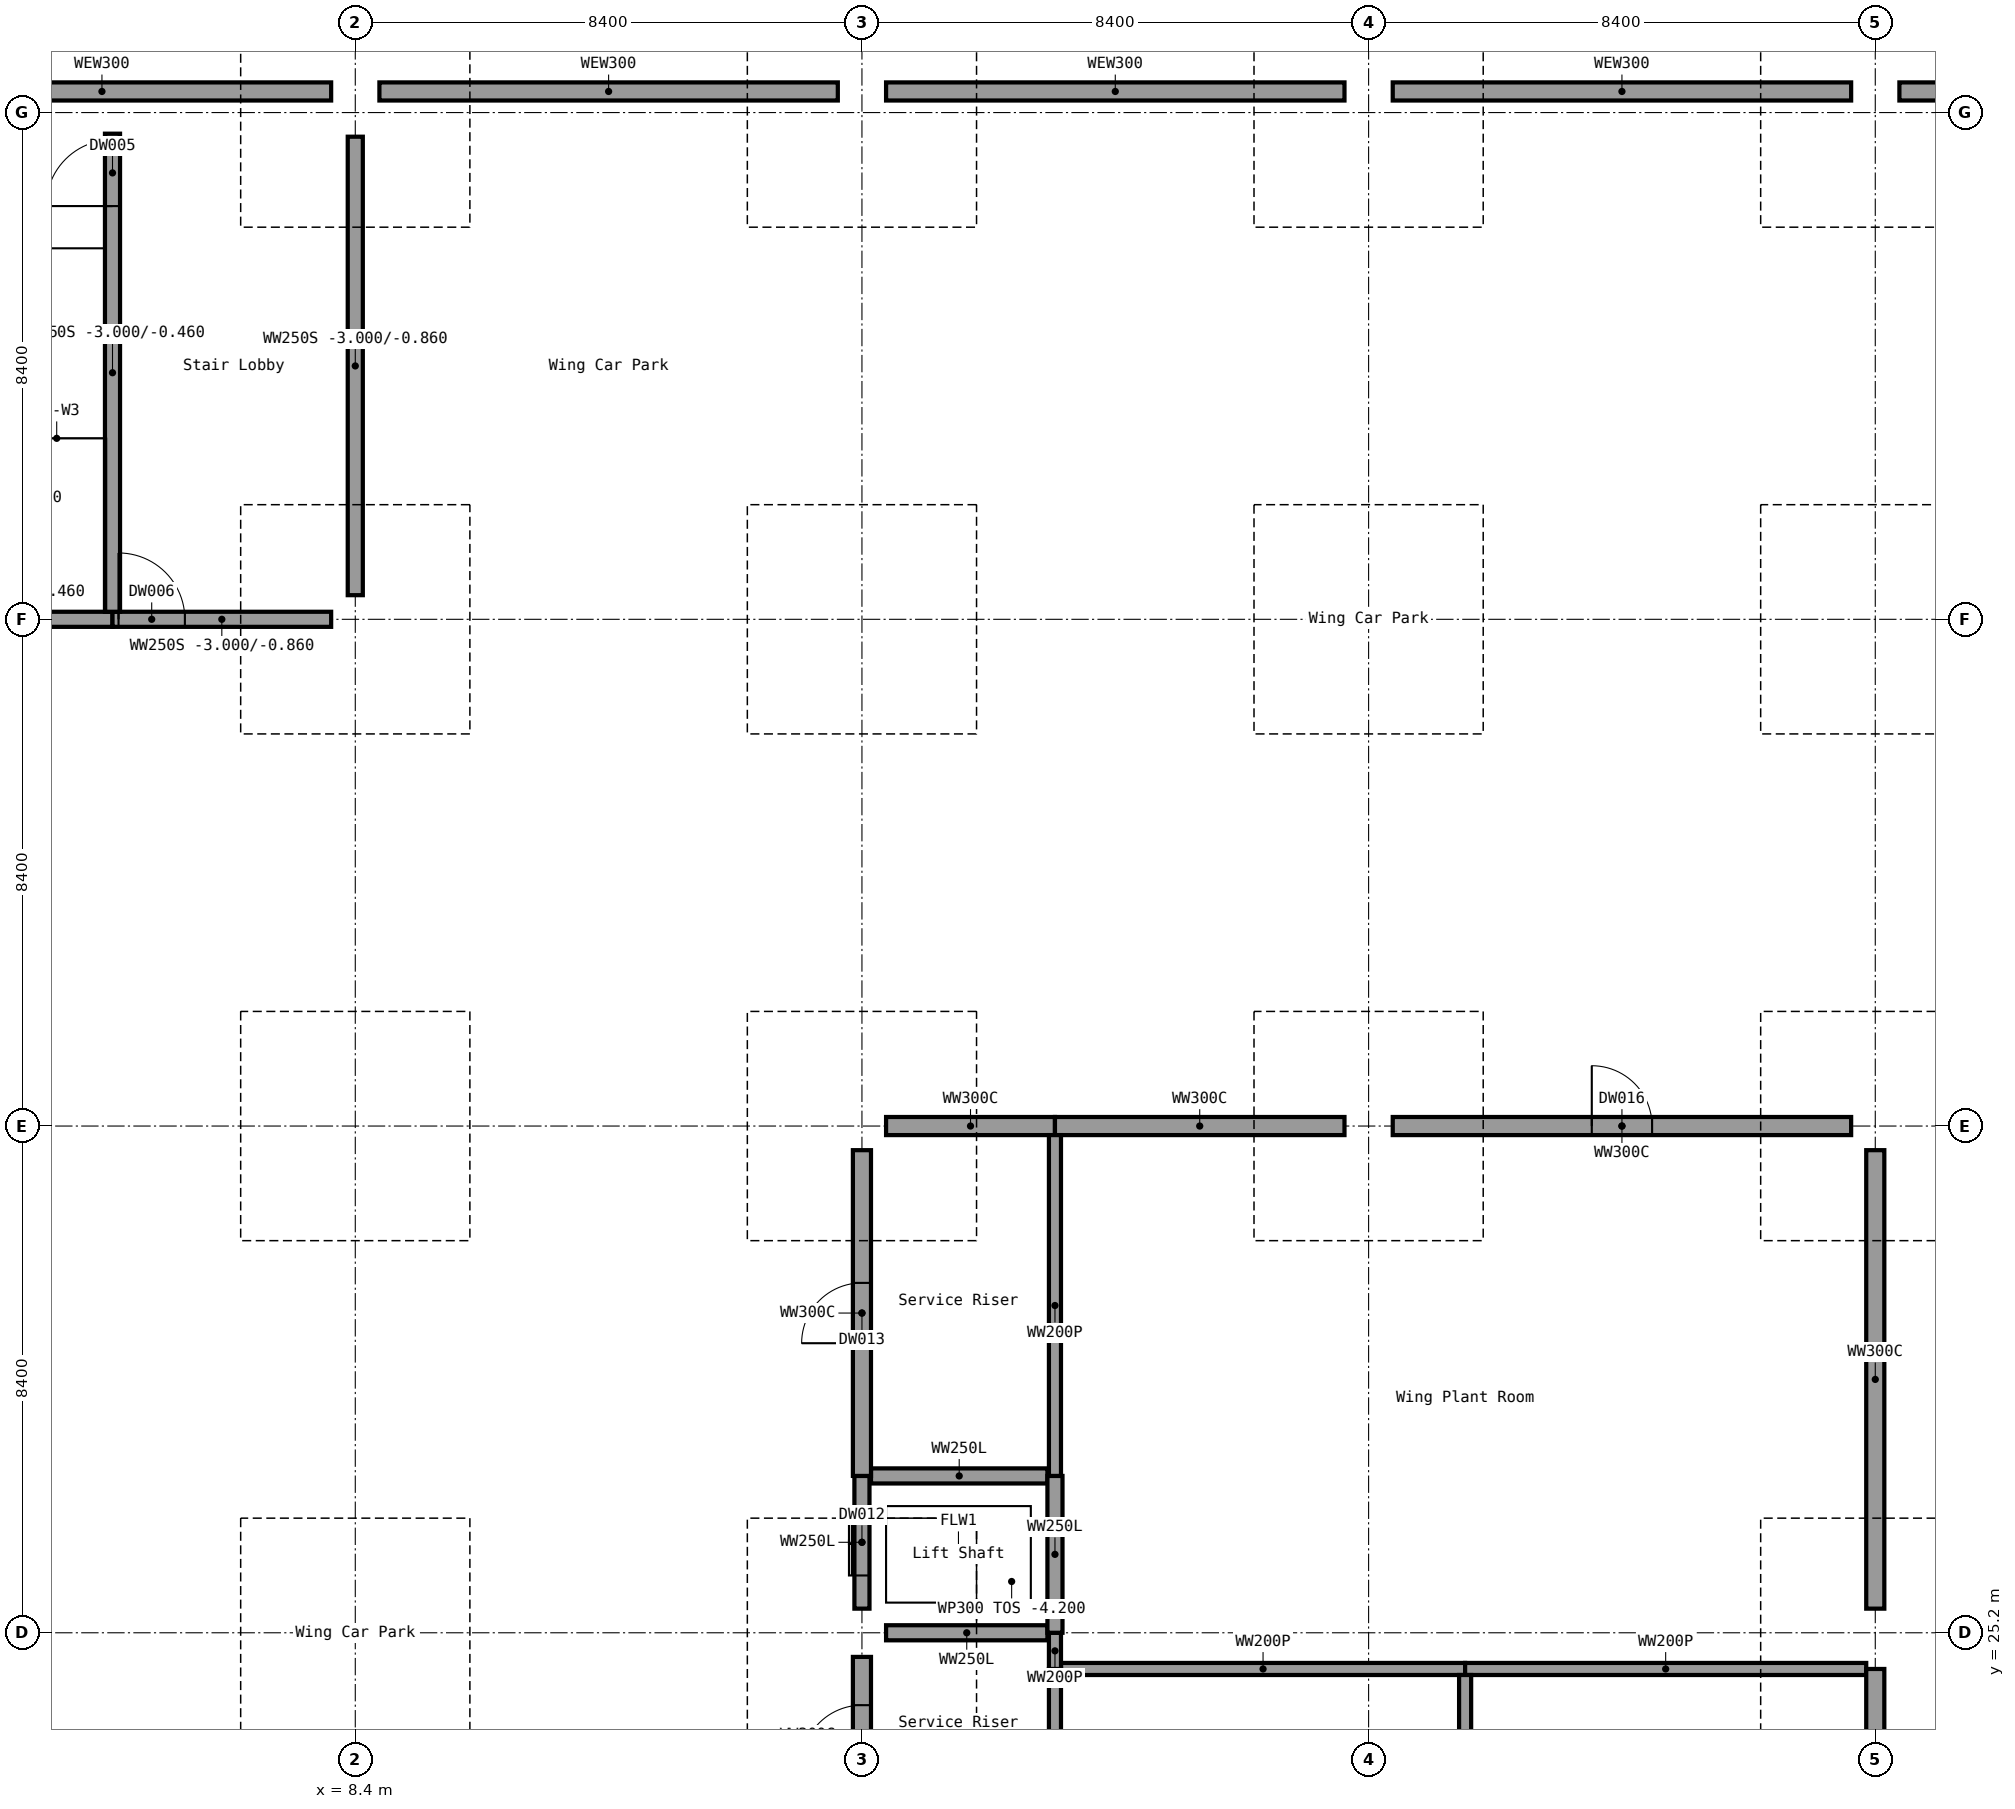
"""IFC4 building model, lengths in metres.
Left out: names, types, materials, properties, quantities, classifications, styles, units other than length and angle.
Written with IfcOpenShell. Run it as: python <this file> out.ifc"""

import sys

from ifc_helpers import new_model, si_unit, direction, frame, frame_2d, origin, origin_2d, place, context, subcontext, project, spatial, rectangle, extrude, element, fill, save


model = new_model("IFC4")
c1 = context("Model", 3, precision=1e-05, world=origin(), true_north=direction((0.0, 1.0)))
c2 = subcontext(c1, "Body", "Model", "MODEL_VIEW")
j1 = project(units=[si_unit("LENGTHUNIT", "METRE"), si_unit("PLANEANGLEUNIT", "RADIAN")], contexts=[c1])
p1 = place(None, origin())
s1 = spatial("IfcSite", under=j1, at=p1, CompositionType="ELEMENT")
p2 = place(p1, origin())
s2 = spatial("IfcBuilding", under=s1, at=p2, CompositionType="ELEMENT")
p3 = place(p2, frame((0.0, 0.0, -3.0)))
s3 = spatial("IfcBuildingStorey", under=s2, at=p3, CompositionType="ELEMENT", Elevation=-3.0)
for number, where, z_axis, x_axis in (
    (1, (8.4, 25.2, 0.0), (0.0, 0.0, 1.0), (1.0, 0.0, 0.0)),
    (2, (8.4, 33.6, 0.0), (0.0, 0.0, 1.0), (1.0, 0.0, 0.0)),
    (3, (8.4, 42.0, 0.0), (0.0, 0.0, 1.0), (1.0, 0.0, 0.0)),
    (4, (8.4, 50.4, 0.0), (0.0, 0.0, 1.0), (1.0, 0.0, 0.0)),
    (5, (16.8, 25.2, 0.0), (0.0, 0.0, 1.0), (1.0, 0.0, 0.0)),
    (6, (16.8, 33.6, 0.0), (0.0, 0.0, 1.0), (1.0, 0.0, 0.0)),
    (7, (16.8, 42.0, 0.0), (0.0, 0.0, 1.0), (1.0, 0.0, 0.0)),
    (8, (16.8, 50.4, 0.0), (0.0, 0.0, 1.0), (1.0, 0.0, 0.0)),
    (9, (25.2, 33.6, 0.0), (0.0, 0.0, 1.0), (1.0, 0.0, 0.0)),
    (10, (25.2, 42.0, 0.0), (0.0, 0.0, 1.0), (1.0, 0.0, 0.0)),
    (11, (25.2, 50.4, 0.0), (0.0, 0.0, 1.0), (1.0, 0.0, 0.0)),
    (12, (33.6, 25.2, 0.0), (0.0, 0.0, 1.0), (1.0, 0.0, 0.0)),
    (13, (33.6, 33.6, 0.0), (0.0, 0.0, 1.0), (1.0, 0.0, 0.0)),
    (14, (33.6, 42.0, 0.0), (0.0, 0.0, 1.0), (1.0, 0.0, 0.0)),
    (15, (33.6, 50.4, 0.0), (0.0, 0.0, 1.0), (1.0, 0.0, 0.0)),
):
    element("IfcColumn", number, at=place(p3, frame(where, z_axis=z_axis, x_axis=x_axis)), inside=s3, PredefinedType="COLUMN", context=c2, shape_type="SweptSolid", body=[
        extrude(rectangle(XDim=0.8, YDim=0.8, at=origin_2d()), origin(), (0.0, 0.0, 1.0), 3.0),
    ])
p4 = place(p3, frame((0.4, 50.75, 0.0), z_axis=(0.0, 0.0, 1.0), x_axis=(1.0, 0.0, 0.0)))
e16 = element("IfcWall", 16, at=p4, inside=s3, PredefinedType="SOLIDWALL", context=c2, shape_type="SweptSolid", body=[
    extrude(rectangle(XDim=7.6, YDim=0.3, at=frame_2d((3.8, 0.0))), origin(), (0.0, 0.0, 1.0), 2.3),
])
p5 = place(p3, frame((8.8, 50.75, 0.0), z_axis=(0.0, 0.0, 1.0), x_axis=(1.0, 0.0, 0.0)))
e17 = element("IfcWall", 17, at=p5, inside=s3, PredefinedType="SOLIDWALL", context=c2, shape_type="SweptSolid", body=[
    extrude(rectangle(XDim=7.6, YDim=0.3, at=frame_2d((3.8, 0.0))), origin(), (0.0, 0.0, 1.0), 2.3),
])
p6 = place(p3, frame((17.2, 50.75, 0.0), z_axis=(0.0, 0.0, 1.0), x_axis=(1.0, 0.0, 0.0)))
e18 = element("IfcWall", 18, at=p6, inside=s3, PredefinedType="SOLIDWALL", context=c2, shape_type="SweptSolid", body=[
    extrude(rectangle(XDim=7.6, YDim=0.3, at=frame_2d((3.8, 0.0))), origin(), (0.0, 0.0, 1.0), 2.3),
])
p7 = place(p3, frame((25.6, 50.75, 0.0), z_axis=(0.0, 0.0, 1.0), x_axis=(1.0, 0.0, 0.0)))
e19 = element("IfcWall", 19, at=p7, inside=s3, PredefinedType="SOLIDWALL", context=c2, shape_type="SweptSolid", body=[
    extrude(rectangle(XDim=7.6, YDim=0.3, at=frame_2d((3.8, 0.0))), origin(), (0.0, 0.0, 1.0), 2.3),
])
p8 = place(p3, frame((34.0, 50.75, 0.0), z_axis=(0.0, 0.0, 1.0), x_axis=(1.0, 0.0, 0.0)))
e20 = element("IfcWall", 20, at=p8, inside=s3, PredefinedType="SOLIDWALL", context=c2, shape_type="SweptSolid", body=[
    extrude(rectangle(XDim=7.6, YDim=0.3, at=frame_2d((3.8, 0.0))), origin(), (0.0, 0.0, 1.0), 2.3),
])
p9 = place(p3, frame((20.1, 24.6, 0.0), z_axis=(0.0, 0.0, 1.0), x_axis=(1.0, 0.0, 0.0)))
e21 = element("IfcWall", 21, at=p9, inside=s3, PredefinedType="SOLIDWALL", context=c2, shape_type="SweptSolid", body=[
    extrude(rectangle(XDim=6.7, YDim=0.2, at=frame_2d((3.35, 0.0))), origin(), (0.0, 0.0, 1.0), 2.54),
])
p10 = place(p3, frame((26.8, 24.6, 0.0), z_axis=(0.0, 0.0, 1.0), x_axis=(1.0, 0.0, 0.0)))
e22 = element("IfcWall", 22, at=p10, inside=s3, PredefinedType="SOLIDWALL", context=c2, shape_type="SweptSolid", body=[
    extrude(rectangle(XDim=6.65, YDim=0.2, at=frame_2d((3.325, 0.0))), origin(), (0.0, 0.0, 1.0), 2.54),
])
p11 = place(p3, frame((17.2, 25.2, -1.2), z_axis=(0.0, 0.0, 1.0), x_axis=(1.0, 0.0, 0.0)))
e23 = element("IfcWall", 23, at=p11, inside=s3, PredefinedType="SHEAR", context=c2, shape_type="SweptSolid", body=[
    extrude(rectangle(XDim=2.675, YDim=0.25, at=frame_2d((1.337, 0.0))), origin(), (0.0, 0.0, 1.0), 3.74),
])
p12 = place(p3, frame((16.95, 27.8, -1.2), z_axis=(0.0, 0.0, 1.0), x_axis=(1.0, 0.0, 0.0)))
e24 = element("IfcWall", 24, at=p12, inside=s3, PredefinedType="SHEAR", context=c2, shape_type="SweptSolid", body=[
    extrude(rectangle(XDim=2.925, YDim=0.25, at=frame_2d((1.462, 0.0))), origin(), (0.0, 0.0, 1.0), 3.74),
])
p13 = place(p3, frame((17.2, 33.6, 0.0), z_axis=(0.0, 0.0, 1.0), x_axis=(1.0, 0.0, 0.0)))
e25 = element("IfcWall", 25, at=p13, inside=s3, PredefinedType="SHEAR", context=c2, shape_type="SweptSolid", body=[
    extrude(rectangle(XDim=2.8, YDim=0.3, at=frame_2d((1.4, 0.0))), origin(), (0.0, 0.0, 1.0), 2.54),
])
p14 = place(p3, frame((20.0, 33.6, 0.0), z_axis=(0.0, 0.0, 1.0), x_axis=(1.0, 0.0, 0.0)))
e26 = element("IfcWall", 26, at=p14, inside=s3, PredefinedType="SHEAR", context=c2, shape_type="SweptSolid", body=[
    extrude(rectangle(XDim=4.8, YDim=0.3, at=frame_2d((2.4, 0.0))), origin(), (0.0, 0.0, 1.0), 2.54),
])
p15 = place(p3, frame((25.6, 33.6, 0.0), z_axis=(0.0, 0.0, 1.0), x_axis=(1.0, 0.0, 0.0)))
e27 = element("IfcWall", 27, at=p15, inside=s3, PredefinedType="SHEAR", context=c2, shape_type="SweptSolid", body=[
    extrude(rectangle(XDim=7.6, YDim=0.3, at=frame_2d((3.8, 0.0))), origin(), (0.0, 0.0, 1.0), 2.54),
])
p16 = place(p15, frame((3.3, 0.0, 0.0)))
e28 = element("IfcOpeningElement", 28, at=p16, cuts=e27, PredefinedType="OPENING", context=c2, shape_type="SweptSolid", body=[
    extrude(rectangle(XDim=1.0, YDim=2.1, at=frame_2d((0.5, 1.05))), frame((0.0, 0.15, 0.0), z_axis=(0.0, -1.0, 0.0), x_axis=(1.0, 0.0, 0.0)), (0.0, 0.0, 1.0), 0.3),
])
p17 = place(p3, frame((0.4, 42.0, 0.0), z_axis=(0.0, 0.0, 1.0), x_axis=(1.0, 0.0, 0.0)))
e29 = element("IfcWall", 29, at=p17, inside=s3, PredefinedType="SHEAR", context=c2, shape_type="SweptSolid", body=[
    extrude(rectangle(XDim=3.975, YDim=0.25, at=frame_2d((1.988, 0.0))), origin(), (0.0, 0.0, 1.0), 2.54),
])
p18 = place(p3, frame((4.375, 42.0, 0.0), z_axis=(0.0, 0.0, 1.0), x_axis=(1.0, 0.0, 0.0)))
e30 = element("IfcWall", 30, at=p18, inside=s3, PredefinedType="SHEAR", context=c2, shape_type="SweptSolid", body=[
    extrude(rectangle(XDim=3.625, YDim=0.25, at=frame_2d((1.812, 0.0))), origin(), (0.0, 0.0, 1.0), 2.14),
])
p19 = place(p18, frame((0.1, 0.0, 0.0)))
e31 = element("IfcOpeningElement", 31, at=p19, cuts=e30, PredefinedType="OPENING", context=c2, shape_type="SweptSolid", body=[
    extrude(rectangle(XDim=1.1, YDim=2.1, at=frame_2d((0.55, 1.05))), frame((0.0, 0.125, 0.0), z_axis=(0.0, -1.0, 0.0), x_axis=(1.0, 0.0, 0.0)), (0.0, 0.0, 1.0), 0.25),
])
p20 = place(p3, frame((4.375, 42.125, 0.0), z_axis=(0.0, 0.0, 1.0), x_axis=(0.0, 1.0, 0.0)))
e32 = element("IfcWall", 32, at=p20, inside=s3, PredefinedType="SHEAR", context=c2, shape_type="SweptSolid", body=[
    extrude(rectangle(XDim=7.925, YDim=0.25, at=frame_2d((3.962, 0.0))), origin(), (0.0, 0.0, 1.0), 2.54),
])
p21 = place(p20, frame((6.725, 0.0, 0.0)))
e33 = element("IfcOpeningElement", 33, at=p21, cuts=e32, PredefinedType="OPENING", context=c2, shape_type="SweptSolid", body=[
    extrude(rectangle(XDim=1.1, YDim=2.1, at=frame_2d((0.55, 1.05))), frame((0.0, 0.125, 0.0), z_axis=(0.0, -1.0, 0.0), x_axis=(1.0, 0.0, 0.0)), (0.0, 0.0, 1.0), 0.25),
])
p22 = place(p3, frame((8.4, 42.4, 0.0), z_axis=(0.0, 0.0, 1.0), x_axis=(0.0, 1.0, 0.0)))
e34 = element("IfcWall", 34, at=p22, inside=s3, PredefinedType="SHEAR", context=c2, shape_type="SweptSolid", body=[
    extrude(rectangle(XDim=7.6, YDim=0.25, at=frame_2d((3.8, 0.0))), origin(), (0.0, 0.0, 1.0), 2.14),
])
p23 = place(p3, frame((16.8, 22.2, 0.0), z_axis=(0.0, 0.0, 1.0), x_axis=(0.0, 1.0, 0.0)))
e35 = element("IfcWall", 35, at=p23, inside=s3, PredefinedType="SHEAR", context=c2, shape_type="SweptSolid", body=[
    extrude(rectangle(XDim=2.6, YDim=0.3, at=frame_2d((1.3, 0.0))), origin(), (0.0, 0.0, 1.0), 2.54),
])
p24 = place(p23, frame((0.8, 0.0, 0.0)))
e36 = element("IfcOpeningElement", 36, at=p24, cuts=e35, PredefinedType="OPENING", context=c2, shape_type="SweptSolid", body=[
    extrude(rectangle(XDim=1.0, YDim=2.1, at=frame_2d((0.5, 1.05))), frame((0.0, 0.15, 0.0), z_axis=(0.0, -1.0, 0.0), x_axis=(1.0, 0.0, 0.0)), (0.0, 0.0, 1.0), 0.3),
])
p25 = place(p3, frame((16.8, 25.6, -1.2), z_axis=(0.0, 0.0, 1.0), x_axis=(0.0, 1.0, 0.0)))
e37 = element("IfcWall", 37, at=p25, inside=s3, PredefinedType="SHEAR", context=c2, shape_type="SweptSolid", body=[
    extrude(rectangle(XDim=2.2, YDim=0.25, at=frame_2d((1.1, 0.0))), origin(), (0.0, 0.0, 1.0), 3.74),
])
p26 = place(p25, frame((0.55, 0.0, 1.2)))
e38 = element("IfcOpeningElement", 38, at=p26, cuts=e37, PredefinedType="OPENING", context=c2, shape_type="SweptSolid", body=[
    extrude(rectangle(XDim=1.1, YDim=2.1, at=frame_2d((0.55, 1.05))), frame((0.0, 0.125, 0.0), z_axis=(0.0, -1.0, 0.0), x_axis=(1.0, 0.0, 0.0)), (0.0, 0.0, 1.0), 0.25),
])
p27 = place(p3, frame((16.8, 27.8, 0.0), z_axis=(0.0, 0.0, 1.0), x_axis=(0.0, 1.0, 0.0)))
e39 = element("IfcWall", 39, at=p27, inside=s3, PredefinedType="SHEAR", context=c2, shape_type="SweptSolid", body=[
    extrude(rectangle(XDim=5.4, YDim=0.3, at=frame_2d((2.7, 0.0))), origin(), (0.0, 0.0, 1.0), 2.54),
])
p28 = place(p27, frame((2.2, 0.0, 0.0)))
e40 = element("IfcOpeningElement", 40, at=p28, cuts=e39, PredefinedType="OPENING", context=c2, shape_type="SweptSolid", body=[
    extrude(rectangle(XDim=1.0, YDim=2.1, at=frame_2d((0.5, 1.05))), frame((0.0, 0.15, 0.0), z_axis=(0.0, -1.0, 0.0), x_axis=(1.0, 0.0, 0.0)), (0.0, 0.0, 1.0), 0.3),
])
p29 = place(p3, frame((20.0, 22.2, 0.0), z_axis=(0.0, 0.0, 1.0), x_axis=(0.0, 1.0, 0.0)))
e41 = element("IfcWall", 41, at=p29, inside=s3, PredefinedType="SOLIDWALL", context=c2, shape_type="SweptSolid", body=[
    extrude(rectangle(XDim=2.4, YDim=0.2, at=frame_2d((1.2, 0.0))), origin(), (0.0, 0.0, 1.0), 2.54),
])
p30 = place(p3, frame((20.0, 24.6, 0.0), z_axis=(0.0, 0.0, 1.0), x_axis=(0.0, 1.0, 0.0)))
e42 = element("IfcWall", 42, at=p30, inside=s3, PredefinedType="SOLIDWALL", context=c2, shape_type="SweptSolid", body=[
    extrude(rectangle(XDim=0.6, YDim=0.2, at=frame_2d((0.3, 0.0))), origin(), (0.0, 0.0, 1.0), 2.54),
])
p31 = place(p3, frame((20.0, 25.2, -1.2), z_axis=(0.0, 0.0, 1.0), x_axis=(0.0, 1.0, 0.0)))
e43 = element("IfcWall", 43, at=p31, inside=s3, PredefinedType="SHEAR", context=c2, shape_type="SweptSolid", body=[
    extrude(rectangle(XDim=2.6, YDim=0.25, at=frame_2d((1.3, 0.0))), origin(), (0.0, 0.0, 1.0), 3.74),
])
p32 = place(p3, frame((20.0, 27.8, 0.0), z_axis=(0.0, 0.0, 1.0), x_axis=(0.0, 1.0, 0.0)))
e44 = element("IfcWall", 44, at=p32, inside=s3, PredefinedType="SOLIDWALL", context=c2, shape_type="SweptSolid", body=[
    extrude(rectangle(XDim=5.65, YDim=0.2, at=frame_2d((2.825, 0.0))), origin(), (0.0, 0.0, 1.0), 2.54),
])
p33 = place(p3, frame((26.8, 16.95, 0.0), z_axis=(0.0, 0.0, 1.0), x_axis=(0.0, 1.0, 0.0)))
e45 = element("IfcWall", 45, at=p33, inside=s3, PredefinedType="SOLIDWALL", context=c2, shape_type="SweptSolid", body=[
    extrude(rectangle(XDim=7.55, YDim=0.2, at=frame_2d((3.775, 0.0))), origin(), (0.0, 0.0, 1.0), 2.54),
])
p34 = place(p3, frame((33.6, 17.2, 0.0), z_axis=(0.0, 0.0, 1.0), x_axis=(0.0, 1.0, 0.0)))
e46 = element("IfcWall", 46, at=p34, inside=s3, PredefinedType="SHEAR", context=c2, shape_type="SweptSolid", body=[
    extrude(rectangle(XDim=7.4, YDim=0.3, at=frame_2d((3.7, 0.0))), origin(), (0.0, 0.0, 1.0), 2.54),
])
p35 = place(p3, frame((33.6, 25.6, 0.0), z_axis=(0.0, 0.0, 1.0), x_axis=(0.0, 1.0, 0.0)))
e47 = element("IfcWall", 47, at=p35, inside=s3, PredefinedType="SHEAR", context=c2, shape_type="SweptSolid", body=[
    extrude(rectangle(XDim=7.6, YDim=0.3, at=frame_2d((3.8, 0.0))), origin(), (0.0, 0.0, 1.0), 2.54),
])
p36 = place(p21, origin())
e48 = element("IfcDoor", 48, at=p36, inside=s3, OperationType="SINGLE_SWING_RIGHT", PredefinedType="DOOR", context=c2, shape_type="SweptSolid", body=[
    extrude(rectangle(XDim=1.1, YDim=2.1, at=frame_2d((0.55, 1.05))), frame((0.0, 0.025, 0.0), z_axis=(0.0, -1.0, 0.0), x_axis=(1.0, 0.0, 0.0)), (0.0, 0.0, 1.0), 0.05),
])
fill(e33, e48)
p37 = place(p19, origin())
e49 = element("IfcDoor", 49, at=p37, inside=s3, OperationType="SINGLE_SWING_LEFT", PredefinedType="DOOR", context=c2, shape_type="SweptSolid", body=[
    extrude(rectangle(XDim=1.1, YDim=2.1, at=frame_2d((0.55, 1.05))), frame((0.0, 0.025, 0.0), z_axis=(0.0, -1.0, 0.0), x_axis=(1.0, 0.0, 0.0)), (0.0, 0.0, 1.0), 0.05),
])
fill(e31, e49)
p38 = place(p24, origin())
e50 = element("IfcDoor", 50, at=p38, inside=s3, OperationType="SINGLE_SWING_LEFT", PredefinedType="DOOR", context=c2, shape_type="SweptSolid", body=[
    extrude(rectangle(XDim=1.0, YDim=2.1, at=frame_2d((0.5, 1.05))), frame((0.0, 0.025, 0.0), z_axis=(0.0, -1.0, 0.0), x_axis=(1.0, 0.0, 0.0)), (0.0, 0.0, 1.0), 0.05),
])
fill(e36, e50)
p39 = place(p26, origin())
e51 = element("IfcDoor", 51, at=p39, inside=s3, OperationType="DOUBLE_DOOR_SLIDING", PredefinedType="DOOR", context=c2, shape_type="SweptSolid", body=[
    extrude(rectangle(XDim=1.1, YDim=2.1, at=frame_2d((0.55, 1.05))), frame((0.0, 0.025, 0.0), z_axis=(0.0, -1.0, 0.0), x_axis=(1.0, 0.0, 0.0)), (0.0, 0.0, 1.0), 0.05),
])
fill(e38, e51)
p40 = place(p28, origin())
e52 = element("IfcDoor", 52, at=p40, inside=s3, OperationType="SINGLE_SWING_LEFT", PredefinedType="DOOR", context=c2, shape_type="SweptSolid", body=[
    extrude(rectangle(XDim=1.0, YDim=2.1, at=frame_2d((0.5, 1.05))), frame((0.0, 0.025, 0.0), z_axis=(0.0, -1.0, 0.0), x_axis=(1.0, 0.0, 0.0)), (0.0, 0.0, 1.0), 0.05),
])
fill(e40, e52)
p41 = place(p16, origin())
e53 = element("IfcDoor", 53, at=p41, inside=s3, OperationType="SINGLE_SWING_LEFT", PredefinedType="DOOR", context=c2, shape_type="SweptSolid", body=[
    extrude(rectangle(XDim=1.0, YDim=2.1, at=frame_2d((0.5, 1.05))), frame((0.0, 0.025, 0.0), z_axis=(0.0, -1.0, 0.0), x_axis=(1.0, 0.0, 0.0)), (0.0, 0.0, 1.0), 0.05),
])
fill(e28, e53)
save(model, sys.argv[1])
